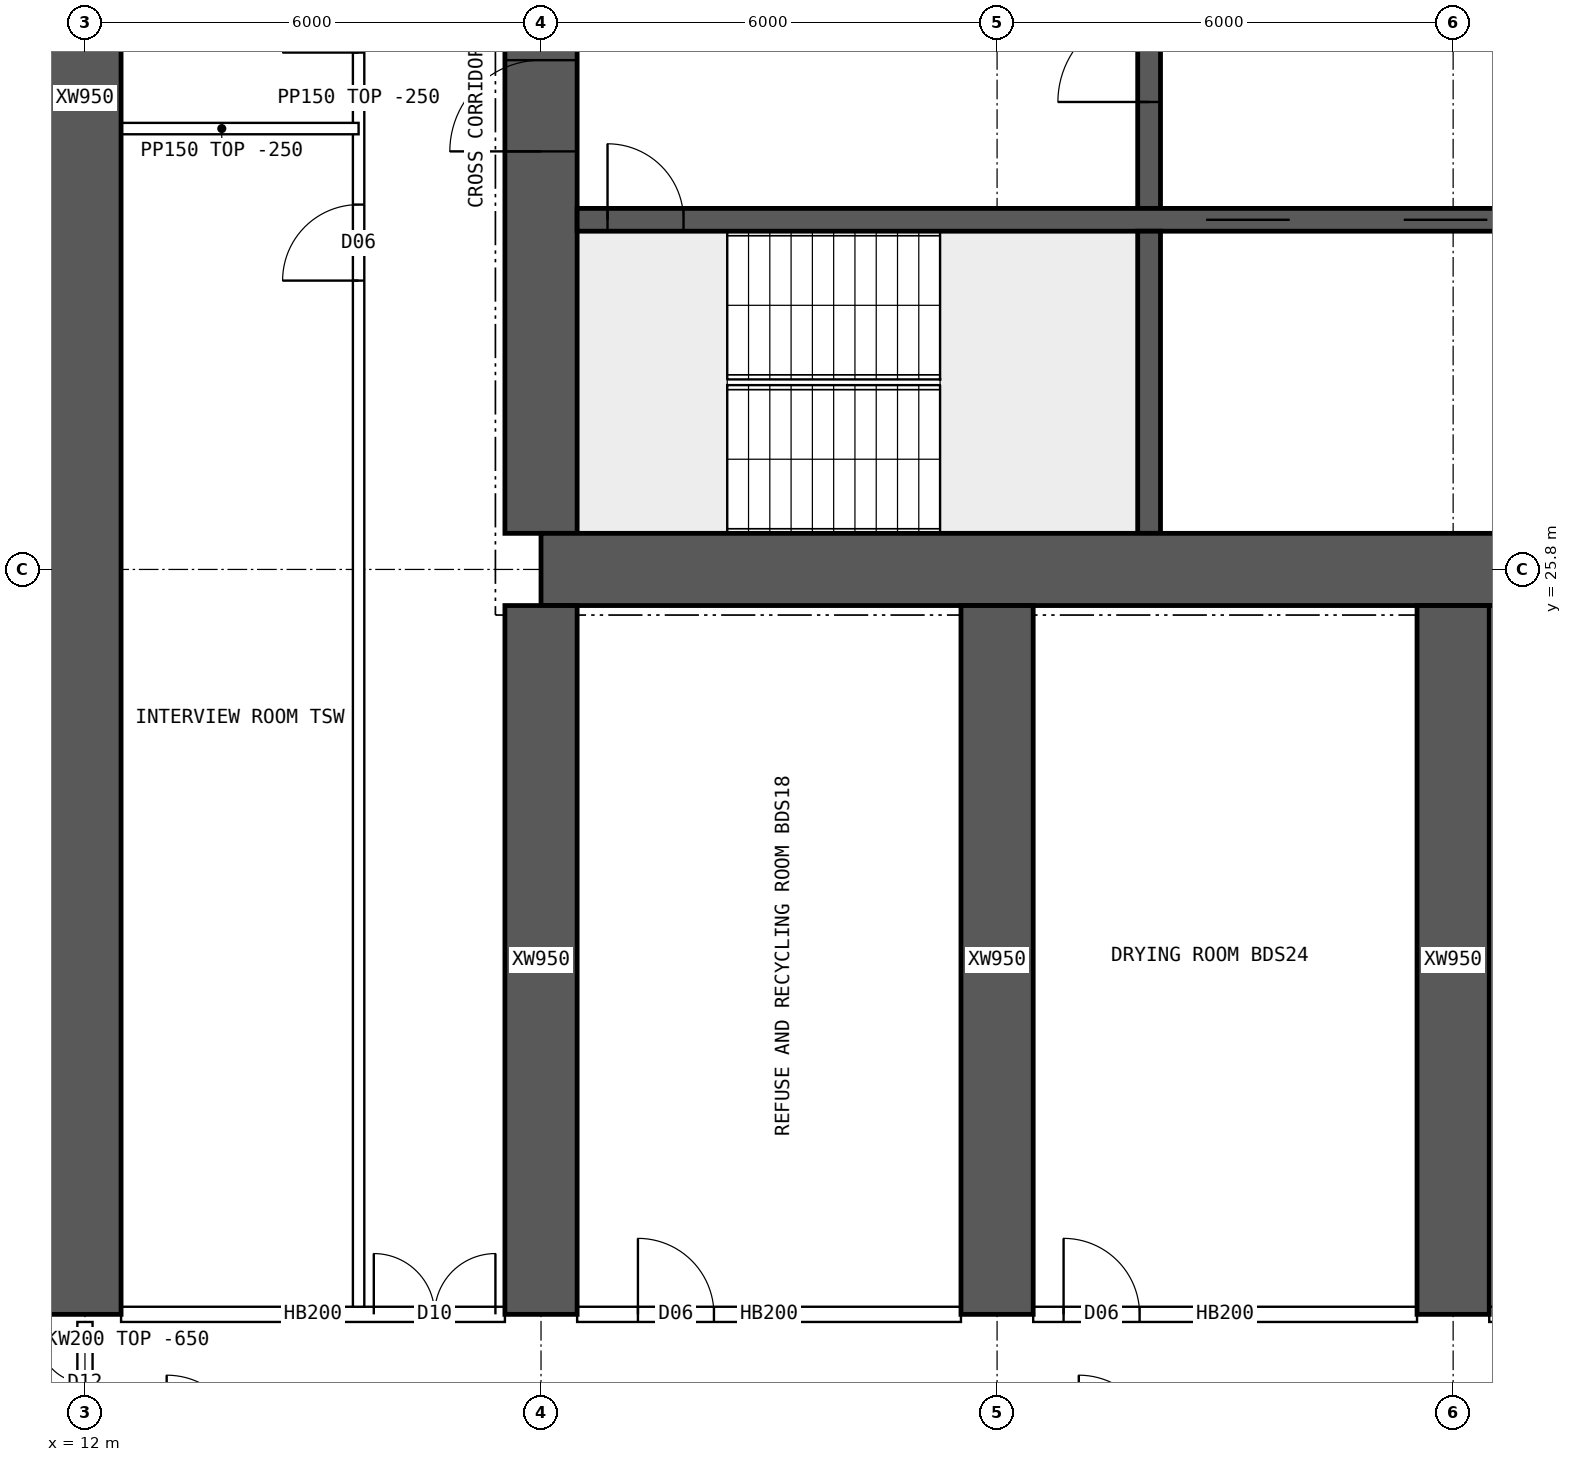
"""IFC4 building model, lengths in metres.
Left out: names, types, materials, properties, quantities, classifications, styles, units other than length and angle.
Written with IfcOpenShell. Run it as: python <this file> out.ifc"""

import sys

from ifc_helpers import new_model, si_unit, direction, frame, frame_2d, origin, place, context, subcontext, project, spatial, polyline, rectangle, outline, extrude, element, fill, save


model = new_model("IFC4")
c1 = context("Model", 3, precision=1e-05, world=origin(), true_north=direction((0.0, 1.0)))
c2 = subcontext(c1, "Body", "Model", "MODEL_VIEW")
j1 = project(units=[si_unit("LENGTHUNIT", "METRE"), si_unit("PLANEANGLEUNIT", "RADIAN")], contexts=[c1])
p1 = place(None, origin())
s1 = spatial("IfcSite", under=j1, at=p1, CompositionType="ELEMENT")
p2 = place(p1, origin())
s2 = spatial("IfcBuilding", under=s1, at=p2, CompositionType="ELEMENT")
p3 = place(p2, frame((0.0, 0.0, 106.9)))
s3 = spatial("IfcBuildingStorey", under=s2, at=p3, CompositionType="ELEMENT", Elevation=106.9)
p4 = place(p3, frame((18.0, 25.8, 0.0), z_axis=(0.0, 0.0, 1.0), x_axis=(1.0, 0.0, 0.0)))
e1 = element("IfcWall", 1, at=p4, inside=s3, PredefinedType="SHEAR", context=c2, shape_type="SweptSolid", body=[
    extrude(rectangle(XDim=48.0, YDim=0.95, at=frame_2d((24.0, 0.0))), origin(), (0.0, 0.0, 1.0), 3.75),
])
p5 = place(p3, frame((18.0, 26.275, 0.0), z_axis=(0.0, 0.0, 1.0), x_axis=(0.0, 1.0, 0.0)))
e2 = element("IfcWall", 2, at=p5, inside=s3, PredefinedType="SHEAR", context=c2, shape_type="SweptSolid", body=[
    extrude(rectangle(XDim=11.45, YDim=0.95, at=frame_2d((5.725, 0.0))), origin(), (0.0, 0.0, 1.0), 3.75),
])
p6 = place(p5, frame((5.025, 0.0, 0.0)))
e3 = element("IfcOpeningElement", 3, at=p6, cuts=e2, PredefinedType="OPENING", context=c2, shape_type="SweptSolid", body=[
    extrude(rectangle(XDim=1.2, YDim=2.1, at=frame_2d((0.6, 1.05))), frame((0.0, 0.485, 0.0), z_axis=(0.0, -1.0, 0.0), x_axis=(1.0, 0.0, 0.0)), (0.0, 0.0, 1.0), 0.97),
])
p7 = place(p3, frame((18.475, 30.4, 0.0), z_axis=(0.0, 0.0, 1.0), x_axis=(1.0, 0.0, 0.0)))
e4 = element("IfcWall", 4, at=p7, inside=s3, PredefinedType="SHEAR", context=c2, shape_type="SweptSolid", body=[
    extrude(rectangle(XDim=47.05, YDim=0.3, at=frame_2d((23.525, 0.0))), origin(), (0.0, 0.0, 1.0), 3.75),
])
p8 = place(p7, frame((0.4, 0.0, 0.0)))
e5 = element("IfcOpeningElement", 5, at=p8, cuts=e4, PredefinedType="OPENING", context=c2, shape_type="SweptSolid", body=[
    extrude(rectangle(XDim=1.0, YDim=2.1, at=frame_2d((0.5, 1.05))), frame((0.0, 0.16, 0.0), z_axis=(0.0, -1.0, 0.0), x_axis=(1.0, 0.0, 0.0)), (0.0, 0.0, 1.0), 0.32),
])
p9 = place(p7, frame((45.65, 0.0, 0.0)))
e6 = element("IfcOpeningElement", 6, at=p9, cuts=e4, PredefinedType="OPENING", context=c2, shape_type="SweptSolid", body=[
    extrude(rectangle(XDim=1.0, YDim=2.1, at=frame_2d((0.5, 1.05))), frame((0.0, 0.16, 0.0), z_axis=(0.0, -1.0, 0.0), x_axis=(1.0, 0.0, 0.0)), (0.0, 0.0, 1.0), 0.32),
])
p10 = place(p7, frame((8.275, 0.0, 0.0)))
e7 = element("IfcOpeningElement", 7, at=p10, cuts=e4, PredefinedType="OPENING", context=c2, shape_type="SweptSolid", body=[
    extrude(rectangle(XDim=1.1, YDim=2.1, at=frame_2d((0.55, 1.05))), frame((0.0, 0.16, 0.0), z_axis=(0.0, -1.0, 0.0), x_axis=(1.0, 0.0, 0.0)), (0.0, 0.0, 1.0), 0.32),
])
p11 = place(p7, frame((10.875, 0.0, 0.0)))
e8 = element("IfcOpeningElement", 8, at=p11, cuts=e4, PredefinedType="OPENING", context=c2, shape_type="SweptSolid", body=[
    extrude(rectangle(XDim=1.1, YDim=2.1, at=frame_2d((0.55, 1.05))), frame((0.0, 0.16, 0.0), z_axis=(0.0, -1.0, 0.0), x_axis=(1.0, 0.0, 0.0)), (0.0, 0.0, 1.0), 0.32),
])
p12 = place(p7, frame((13.475, 0.0, 0.0)))
e9 = element("IfcOpeningElement", 9, at=p12, cuts=e4, PredefinedType="OPENING", context=c2, shape_type="SweptSolid", body=[
    extrude(rectangle(XDim=1.1, YDim=2.1, at=frame_2d((0.55, 1.05))), frame((0.0, 0.16, 0.0), z_axis=(0.0, -1.0, 0.0), x_axis=(1.0, 0.0, 0.0)), (0.0, 0.0, 1.0), 0.32),
])
p13 = place(p7, frame((16.075, 0.0, 0.0)))
e10 = element("IfcOpeningElement", 10, at=p13, cuts=e4, PredefinedType="OPENING", context=c2, shape_type="SweptSolid", body=[
    extrude(rectangle(XDim=1.1, YDim=2.1, at=frame_2d((0.55, 1.05))), frame((0.0, 0.16, 0.0), z_axis=(0.0, -1.0, 0.0), x_axis=(1.0, 0.0, 0.0)), (0.0, 0.0, 1.0), 0.32),
])
p14 = place(p7, frame((18.85, 0.0, 0.0)))
e11 = element("IfcOpeningElement", 11, at=p14, cuts=e4, PredefinedType="OPENING", context=c2, shape_type="SweptSolid", body=[
    extrude(rectangle(XDim=0.9, YDim=2.1, at=frame_2d((0.45, 1.05))), frame((0.0, 0.16, 0.0), z_axis=(0.0, -1.0, 0.0), x_axis=(1.0, 0.0, 0.0)), (0.0, 0.0, 1.0), 0.32),
])
p15 = place(p7, frame((30.142, 0.0, 0.0)))
e12 = element("IfcOpeningElement", 12, at=p15, cuts=e4, PredefinedType="OPENING", context=c2, shape_type="SweptSolid", body=[
    extrude(rectangle(XDim=1.1, YDim=2.1, at=frame_2d((0.55, 1.05))), frame((0.0, 0.16, 0.0), z_axis=(0.0, -1.0, 0.0), x_axis=(1.0, 0.0, 0.0)), (0.0, 0.0, 1.0), 0.32),
])
p16 = place(p7, frame((33.675, 0.0, 0.0)))
e13 = element("IfcOpeningElement", 13, at=p16, cuts=e4, PredefinedType="OPENING", context=c2, shape_type="SweptSolid", body=[
    extrude(rectangle(XDim=1.1, YDim=2.1, at=frame_2d((0.55, 1.05))), frame((0.0, 0.16, 0.0), z_axis=(0.0, -1.0, 0.0), x_axis=(1.0, 0.0, 0.0)), (0.0, 0.0, 1.0), 0.32),
])
p17 = place(p7, frame((37.208, 0.0, 0.0)))
e14 = element("IfcOpeningElement", 14, at=p17, cuts=e4, PredefinedType="OPENING", context=c2, shape_type="SweptSolid", body=[
    extrude(rectangle(XDim=1.1, YDim=2.1, at=frame_2d((0.55, 1.05))), frame((0.0, 0.16, 0.0), z_axis=(0.0, -1.0, 0.0), x_axis=(1.0, 0.0, 0.0)), (0.0, 0.0, 1.0), 0.32),
])
p18 = place(p3, frame((26.0, 26.275, 0.0), z_axis=(0.0, 0.0, 1.0), x_axis=(0.0, 1.0, 0.0)))
e15 = element("IfcWall", 15, at=p18, inside=s3, PredefinedType="SHEAR", context=c2, shape_type="SweptSolid", body=[
    extrude(rectangle(XDim=3.975, YDim=0.3, at=frame_2d((1.988, 0.0))), origin(), (0.0, 0.0, 1.0), 3.75),
])
p19 = place(p3, frame((26.0, 30.55, 0.0), z_axis=(0.0, 0.0, 1.0), x_axis=(0.0, 1.0, 0.0)))
e16 = element("IfcWall", 16, at=p19, inside=s3, PredefinedType="SHEAR", context=c2, shape_type="SweptSolid", body=[
    extrude(rectangle(XDim=3.9, YDim=0.3, at=frame_2d((1.95, 0.0))), origin(), (0.0, 0.0, 1.0), 3.75),
])
p20 = place(p19, frame((1.4, 0.0, 0.0)))
e17 = element("IfcOpeningElement", 17, at=p20, cuts=e16, PredefinedType="OPENING", context=c2, shape_type="SweptSolid", body=[
    extrude(rectangle(XDim=1.2, YDim=2.1, at=frame_2d((0.6, 1.05))), frame((0.0, 0.16, 0.0), z_axis=(0.0, -1.0, 0.0), x_axis=(1.0, 0.0, 0.0)), (0.0, 0.0, 1.0), 0.32),
])
p21 = place(p3, frame((12.0, 16.0, 0.0), z_axis=(0.0, 0.0, 1.0), x_axis=(0.0, 1.0, 0.0)))
e18 = element("IfcWall", 18, at=p21, inside=s3, PredefinedType="SHEAR", context=c2, shape_type="SweptSolid", body=[
    extrude(rectangle(XDim=32.0, YDim=0.95, at=frame_2d((16.0, 0.0))), origin(), (0.0, 0.0, 1.0), 3.75),
])
for number, where, z_axis, x_axis in (
    (19, (18.0, 16.0, 0.0), (0.0, 0.0, 1.0), (0.0, 1.0, 0.0)),
    (20, (24.0, 16.0, 0.0), (0.0, 0.0, 1.0), (0.0, 1.0, 0.0)),
    (21, (30.0, 16.0, 0.0), (0.0, 0.0, 1.0), (0.0, 1.0, 0.0)),
):
    element("IfcWall", number, at=place(p3, frame(where, z_axis=z_axis, x_axis=x_axis)), inside=s3, PredefinedType="SHEAR", context=c2, shape_type="SweptSolid", body=[
        extrude(rectangle(XDim=9.325, YDim=0.95, at=frame_2d((4.663, 0.0))), origin(), (0.0, 0.0, 1.0), 3.75),
    ])
p22 = place(p3, frame((12.475, 16.0, 0.0), z_axis=(0.0, 0.0, 1.0), x_axis=(1.0, 0.0, 0.0)))
e22 = element("IfcWall", 22, at=p22, inside=s3, PredefinedType="SOLIDWALL", context=c2, shape_type="SweptSolid", body=[
    extrude(rectangle(XDim=5.05, YDim=0.2, at=frame_2d((2.525, 0.0))), origin(), (0.0, 0.0, 1.0), 3.5),
])
p23 = place(p22, frame((3.325, 0.0, 0.0)))
e23 = element("IfcOpeningElement", 23, at=p23, cuts=e22, PredefinedType="OPENING", context=c2, shape_type="SweptSolid", body=[
    extrude(rectangle(XDim=1.6, YDim=2.1, at=frame_2d((0.8, 1.05))), frame((0.0, 0.11, 0.0), z_axis=(0.0, -1.0, 0.0), x_axis=(1.0, 0.0, 0.0)), (0.0, 0.0, 1.0), 0.22),
])
p24 = place(p3, frame((18.475, 16.0, 0.0), z_axis=(0.0, 0.0, 1.0), x_axis=(1.0, 0.0, 0.0)))
e24 = element("IfcWall", 24, at=p24, inside=s3, PredefinedType="SOLIDWALL", context=c2, shape_type="SweptSolid", body=[
    extrude(rectangle(XDim=5.05, YDim=0.2, at=frame_2d((2.525, 0.0))), origin(), (0.0, 0.0, 1.0), 3.5),
])
p25 = place(p24, frame((0.8, 0.0, 0.0)))
e25 = element("IfcOpeningElement", 25, at=p25, cuts=e24, PredefinedType="OPENING", context=c2, shape_type="SweptSolid", body=[
    extrude(rectangle(XDim=1.0, YDim=2.1, at=frame_2d((0.5, 1.05))), frame((0.0, 0.11, 0.0), z_axis=(0.0, -1.0, 0.0), x_axis=(1.0, 0.0, 0.0)), (0.0, 0.0, 1.0), 0.22),
])
p26 = place(p3, frame((24.475, 16.0, 0.0), z_axis=(0.0, 0.0, 1.0), x_axis=(1.0, 0.0, 0.0)))
e26 = element("IfcWall", 26, at=p26, inside=s3, PredefinedType="SOLIDWALL", context=c2, shape_type="SweptSolid", body=[
    extrude(rectangle(XDim=5.05, YDim=0.2, at=frame_2d((2.525, 0.0))), origin(), (0.0, 0.0, 1.0), 3.5),
])
p27 = place(p26, frame((0.4, 0.0, 0.0)))
e27 = element("IfcOpeningElement", 27, at=p27, cuts=e26, PredefinedType="OPENING", context=c2, shape_type="SweptSolid", body=[
    extrude(rectangle(XDim=1.0, YDim=2.1, at=frame_2d((0.5, 1.05))), frame((0.0, 0.11, 0.0), z_axis=(0.0, -1.0, 0.0), x_axis=(1.0, 0.0, 0.0)), (0.0, 0.0, 1.0), 0.22),
])
p28 = place(p3, frame((30.475, 16.0, 0.0), z_axis=(0.0, 0.0, 1.0), x_axis=(1.0, 0.0, 0.0)))
e28 = element("IfcWall", 28, at=p28, inside=s3, PredefinedType="SOLIDWALL", context=c2, shape_type="SweptSolid", body=[
    extrude(rectangle(XDim=5.05, YDim=0.2, at=frame_2d((2.525, 0.0))), origin(), (0.0, 0.0, 1.0), 3.5),
])
p29 = place(p28, frame((0.35, 0.0, 0.0)))
e29 = element("IfcOpeningElement", 29, at=p29, cuts=e28, PredefinedType="OPENING", context=c2, shape_type="SweptSolid", body=[
    extrude(rectangle(XDim=0.9, YDim=2.1, at=frame_2d((0.45, 1.05))), frame((0.0, 0.11, 0.0), z_axis=(0.0, -1.0, 0.0), x_axis=(1.0, 0.0, 0.0)), (0.0, 0.0, 1.0), 0.22),
])
p30 = place(p28, frame((3.215, 0.0, 0.0)))
e30 = element("IfcOpeningElement", 30, at=p30, cuts=e28, PredefinedType="OPENING", context=c2, shape_type="SweptSolid", body=[
    extrude(rectangle(XDim=0.9, YDim=2.1, at=frame_2d((0.45, 1.05))), frame((0.0, 0.11, 0.0), z_axis=(0.0, -1.0, 0.0), x_axis=(1.0, 0.0, 0.0)), (0.0, 0.0, 1.0), 0.22),
])
p31 = place(p3, frame((15.6, 16.1, 0.0), z_axis=(0.0, 0.0, 1.0), x_axis=(0.0, 1.0, 0.0)))
e31 = element("IfcWall", 31, at=p31, inside=s3, PredefinedType="PARTITIONING", context=c2, shape_type="SweptSolid", body=[
    extrude(rectangle(XDim=31.8, YDim=0.15, at=frame_2d((15.9, 0.0))), origin(), (0.0, 0.0, 1.0), 3.5),
])
p32 = place(p31, frame((13.5, 0.0, 0.0)))
e32 = element("IfcOpeningElement", 32, at=p32, cuts=e31, PredefinedType="OPENING", context=c2, shape_type="SweptSolid", body=[
    extrude(rectangle(XDim=1.0, YDim=2.1, at=frame_2d((0.5, 1.05))), frame((0.0, 0.085, 0.0), z_axis=(0.0, -1.0, 0.0), x_axis=(1.0, 0.0, 0.0)), (0.0, 0.0, 1.0), 0.17),
])
p33 = place(p31, frame((16.5, 0.0, 0.0)))
e33 = element("IfcOpeningElement", 33, at=p33, cuts=e31, PredefinedType="OPENING", context=c2, shape_type="SweptSolid", body=[
    extrude(rectangle(XDim=1.0, YDim=2.1, at=frame_2d((0.5, 1.05))), frame((0.0, 0.085, 0.0), z_axis=(0.0, -1.0, 0.0), x_axis=(1.0, 0.0, 0.0)), (0.0, 0.0, 1.0), 0.17),
])
p34 = place(p3, frame((12.0, 31.6, 0.0), z_axis=(0.0, 0.0, 1.0), x_axis=(1.0, 0.0, 0.0)))
e34 = element("IfcWall", 34, at=p34, inside=s3, PredefinedType="PARTITIONING", context=c2, shape_type="SweptSolid", body=[
    extrude(rectangle(XDim=3.6, YDim=0.15, at=frame_2d((1.8, 0.0))), origin(), (0.0, 0.0, 1.0), 3.5),
])
p35 = place(p3, frame((3.905, 30.85, 0.0), z_axis=(0.0, 0.0, 1.0), x_axis=(1.0, 0.0, 0.0)))
e35 = element("IfcWall", 35, at=p35, inside=s3, PredefinedType="PARTITIONING", context=c2, shape_type="SweptSolid", body=[
    extrude(outline(polyline([(0.0, 0.0), (8.02, 0.0), (8.02, 3.5), (2.397, 3.5), (2.395, 3.05), (1.797, 3.05), (1.795, 3.5), (0.0, 3.5), (0.0, 0.0)])), frame((0.0, 0.075, 0.0), z_axis=(0.0, -1.0, 0.0), x_axis=(1.0, 0.0, 0.0)), (0.0, 0.0, 1.0), 0.15),
])
p36 = place(p3, frame((12.0, 14.3, 0.0), z_axis=(0.0, 0.0, 1.0), x_axis=(0.0, 1.0, 0.0)))
e36 = element("IfcWall", 36, at=p36, inside=s3, PredefinedType="SOLIDWALL", context=c2, shape_type="SweptSolid", body=[
    extrude(outline(polyline([(0.0, 0.0), (1.6, 0.0), (1.6, 3.1), (0.0, 3.1), (0.0, 0.0)])), frame((0.0, 0.1, 0.0), z_axis=(0.0, -1.0, 0.0), x_axis=(1.0, 0.0, 0.0)), (0.0, 0.0, 1.0), 0.2),
])
p37 = place(p36, frame((0.2, 0.0, 0.0)))
e37 = element("IfcOpeningElement", 37, at=p37, cuts=e36, PredefinedType="OPENING", context=c2, shape_type="SweptSolid", body=[
    extrude(rectangle(XDim=1.2, YDim=2.1, at=frame_2d((0.6, 1.05))), frame((0.0, 0.11, 0.0), z_axis=(0.0, -1.0, 0.0), x_axis=(1.0, 0.0, 0.0)), (0.0, 0.0, 1.0), 0.22),
])
p38 = place(p6, origin())
e38 = element("IfcDoor", 38, at=p38, inside=s3, OperationType="SINGLE_SWING_LEFT", PredefinedType="DOOR", context=c2, shape_type="SweptSolid", body=[
    extrude(rectangle(XDim=1.2, YDim=2.1, at=frame_2d((0.6, 1.05))), frame((0.0, 0.025, 0.0), z_axis=(0.0, -1.0, 0.0), x_axis=(1.0, 0.0, 0.0)), (0.0, 0.0, 1.0), 0.05),
])
fill(e3, e38)
p39 = place(p8, origin())
e39 = element("IfcDoor", 39, at=p39, inside=s3, OperationType="SINGLE_SWING_LEFT", PredefinedType="DOOR", context=c2, shape_type="SweptSolid", body=[
    extrude(rectangle(XDim=1.0, YDim=2.1, at=frame_2d((0.5, 1.05))), frame((0.0, 0.025, 0.0), z_axis=(0.0, -1.0, 0.0), x_axis=(1.0, 0.0, 0.0)), (0.0, 0.0, 1.0), 0.05),
])
fill(e5, e39)
p40 = place(p20, origin())
e40 = element("IfcDoor", 40, at=p40, inside=s3, OperationType="SINGLE_SWING_LEFT", PredefinedType="DOOR", context=c2, shape_type="SweptSolid", body=[
    extrude(rectangle(XDim=1.2, YDim=2.1, at=frame_2d((0.6, 1.05))), frame((0.0, 0.025, 0.0), z_axis=(0.0, -1.0, 0.0), x_axis=(1.0, 0.0, 0.0)), (0.0, 0.0, 1.0), 0.05),
])
fill(e17, e40)
p41 = place(p10, origin())
e41 = element("IfcDoor", 41, at=p41, inside=s3, OperationType="DOUBLE_DOOR_SLIDING", PredefinedType="DOOR", context=c2, shape_type="SweptSolid", body=[
    extrude(rectangle(XDim=1.1, YDim=2.1, at=frame_2d((0.55, 1.05))), frame((0.0, 0.025, 0.0), z_axis=(0.0, -1.0, 0.0), x_axis=(1.0, 0.0, 0.0)), (0.0, 0.0, 1.0), 0.05),
])
fill(e7, e41)
p42 = place(p11, origin())
e42 = element("IfcDoor", 42, at=p42, inside=s3, OperationType="DOUBLE_DOOR_SLIDING", PredefinedType="DOOR", context=c2, shape_type="SweptSolid", body=[
    extrude(rectangle(XDim=1.1, YDim=2.1, at=frame_2d((0.55, 1.05))), frame((0.0, 0.025, 0.0), z_axis=(0.0, -1.0, 0.0), x_axis=(1.0, 0.0, 0.0)), (0.0, 0.0, 1.0), 0.05),
])
fill(e8, e42)
p43 = place(p23, origin())
e43 = element("IfcDoor", 43, at=p43, inside=s3, OperationType="DOUBLE_DOOR_SINGLE_SWING", PredefinedType="DOOR", context=c2, shape_type="SweptSolid", body=[
    extrude(rectangle(XDim=1.6, YDim=2.1, at=frame_2d((0.8, 1.05))), frame((0.0, 0.025, 0.0), z_axis=(0.0, -1.0, 0.0), x_axis=(1.0, 0.0, 0.0)), (0.0, 0.0, 1.0), 0.05),
])
fill(e23, e43)
p44 = place(p25, origin())
e44 = element("IfcDoor", 44, at=p44, inside=s3, OperationType="SINGLE_SWING_LEFT", PredefinedType="DOOR", context=c2, shape_type="SweptSolid", body=[
    extrude(rectangle(XDim=1.0, YDim=2.1, at=frame_2d((0.5, 1.05))), frame((0.0, 0.025, 0.0), z_axis=(0.0, -1.0, 0.0), x_axis=(1.0, 0.0, 0.0)), (0.0, 0.0, 1.0), 0.05),
])
fill(e25, e44)
p45 = place(p27, origin())
e45 = element("IfcDoor", 45, at=p45, inside=s3, OperationType="SINGLE_SWING_LEFT", PredefinedType="DOOR", context=c2, shape_type="SweptSolid", body=[
    extrude(rectangle(XDim=1.0, YDim=2.1, at=frame_2d((0.5, 1.05))), frame((0.0, 0.025, 0.0), z_axis=(0.0, -1.0, 0.0), x_axis=(1.0, 0.0, 0.0)), (0.0, 0.0, 1.0), 0.05),
])
fill(e27, e45)
p46 = place(p32, origin())
e46 = element("IfcDoor", 46, at=p46, inside=s3, OperationType="SINGLE_SWING_LEFT", PredefinedType="DOOR", context=c2, shape_type="SweptSolid", body=[
    extrude(rectangle(XDim=1.0, YDim=2.1, at=frame_2d((0.5, 1.05))), frame((0.0, 0.025, 0.0), z_axis=(0.0, -1.0, 0.0), x_axis=(1.0, 0.0, 0.0)), (0.0, 0.0, 1.0), 0.05),
])
fill(e32, e46)
p47 = place(p37, origin())
e47 = element("IfcDoor", 47, at=p47, inside=s3, OperationType="DOUBLE_DOOR_SINGLE_SWING", PredefinedType="DOOR", context=c2, shape_type="SweptSolid", body=[
    extrude(rectangle(XDim=1.2, YDim=2.1, at=frame_2d((0.6, 1.05))), frame((0.0, 0.025, 0.0), z_axis=(0.0, -1.0, 0.0), x_axis=(1.0, 0.0, 0.0)), (0.0, 0.0, 1.0), 0.05),
])
fill(e37, e47)
save(model, sys.argv[1])
